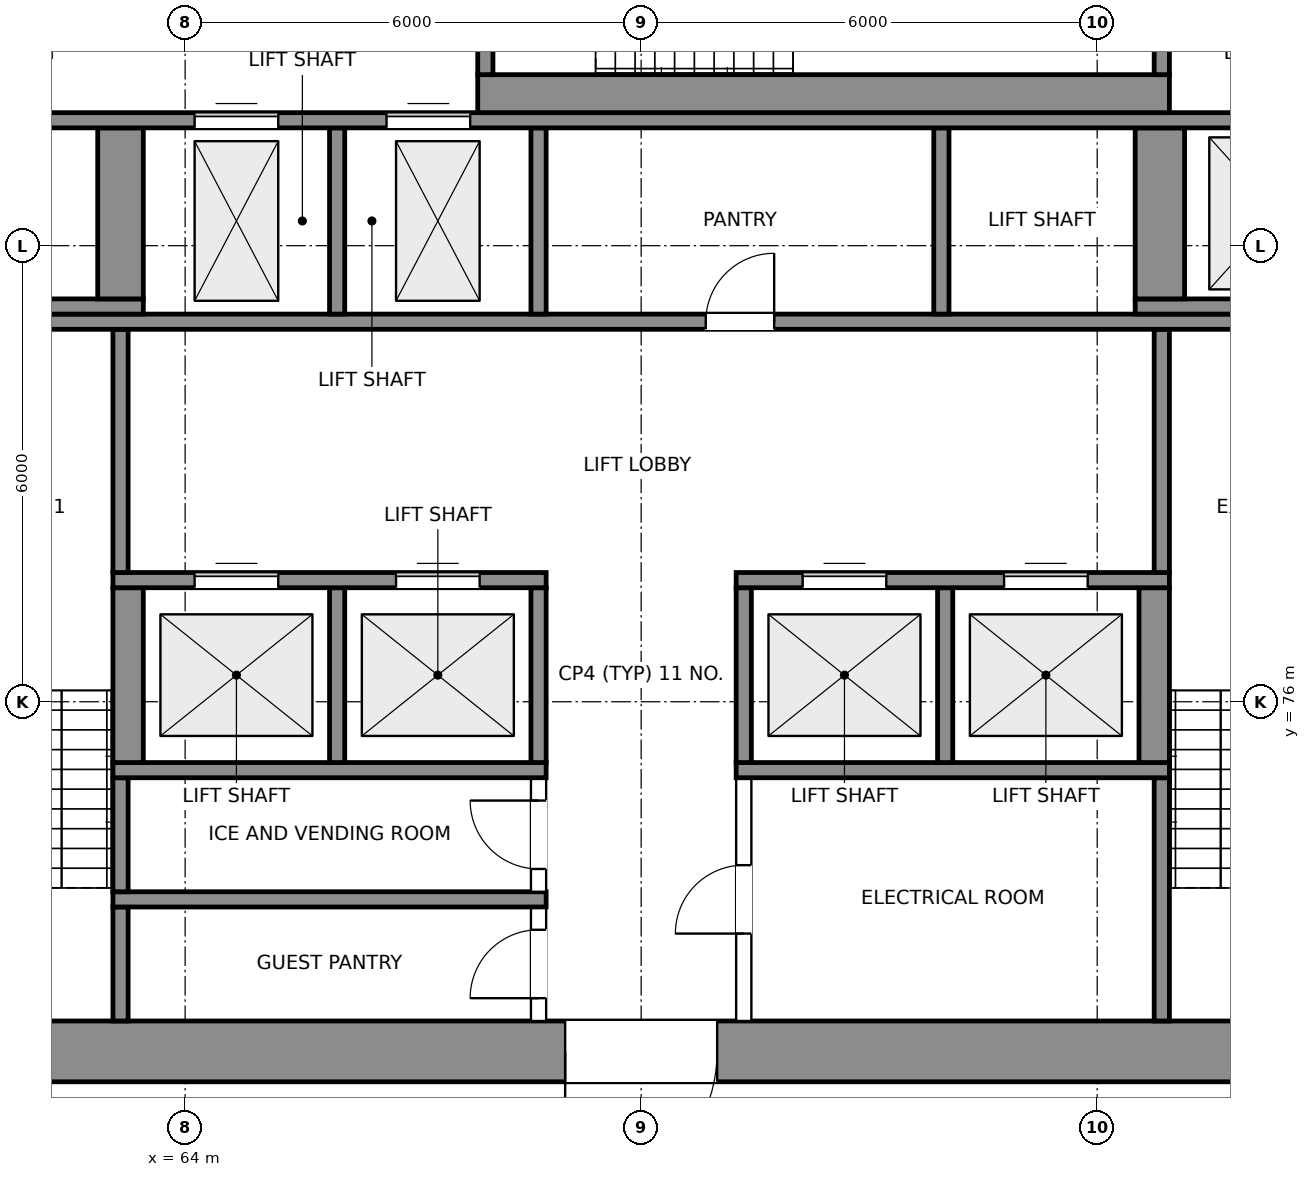
"""IFC4 building model, lengths in metres.
Left out: names, types, materials, properties, quantities, classifications, styles, units other than length and angle.
Written with IfcOpenShell. Run it as: python <this file> out.ifc"""

import sys

from ifc_helpers import new_model, si_unit, direction, frame, frame_2d, origin, place, context, subcontext, project, spatial, rectangle, extrude, element, fill, save


model = new_model("IFC4")
c1 = context("Model", 3, precision=1e-05, world=origin(), true_north=direction((0.0, 1.0)))
c2 = subcontext(c1, "Body", "Model", "MODEL_VIEW")
j1 = project(units=[si_unit("LENGTHUNIT", "METRE"), si_unit("PLANEANGLEUNIT", "RADIAN")], contexts=[c1])
p1 = place(None, origin())
s1 = spatial("IfcSite", under=j1, at=p1, CompositionType="ELEMENT")
p2 = place(p1, origin())
s2 = spatial("IfcBuilding", under=s1, at=p2, CompositionType="ELEMENT")
p3 = place(p2, frame((0.0, 0.0, 204.3)))
s3 = spatial("IfcBuildingStorey", under=s2, at=p3, CompositionType="ELEMENT", Elevation=204.3)
p4 = place(p3, frame((59.0, 71.4, 0.0), z_axis=(0.0, 0.0, 1.0), x_axis=(1.0, 0.0, 0.0)))
e1 = element("IfcWall", 1, at=p4, inside=s3, PredefinedType="SHEAR", context=c2, shape_type="SweptSolid", body=[
    extrude(rectangle(XDim=22.0, YDim=0.8, at=frame_2d((11.0, 0.0))), origin(), (0.0, 0.0, 1.0), 3.9),
])
p5 = place(p4, frame((2.025, 0.0, 0.0)))
e2 = element("IfcOpeningElement", 2, at=p5, cuts=e1, PredefinedType="OPENING", context=c2, shape_type="SweptSolid", body=[
    extrude(rectangle(XDim=1.2, YDim=2.1, at=frame_2d((0.6, 1.05))), frame((0.0, 0.41, 0.0), z_axis=(0.0, -1.0, 0.0), x_axis=(1.0, 0.0, 0.0)), (0.0, 0.0, 1.0), 0.82),
])
p6 = place(p4, frame((18.775, 0.0, 0.0)))
e3 = element("IfcOpeningElement", 3, at=p6, cuts=e1, PredefinedType="OPENING", context=c2, shape_type="SweptSolid", body=[
    extrude(rectangle(XDim=1.2, YDim=2.1, at=frame_2d((0.6, 1.05))), frame((0.0, 0.41, 0.0), z_axis=(0.0, -1.0, 0.0), x_axis=(1.0, 0.0, 0.0)), (0.0, 0.0, 1.0), 0.82),
])
p7 = place(p4, frame((10.0, 0.0, 0.0)))
e4 = element("IfcOpeningElement", 4, at=p7, cuts=e1, PredefinedType="OPENING", context=c2, shape_type="SweptSolid", body=[
    extrude(rectangle(XDim=2.0, YDim=2.1, at=frame_2d((1.0, 1.05))), frame((0.0, 0.41, 0.0), z_axis=(0.0, -1.0, 0.0), x_axis=(1.0, 0.0, 0.0)), (0.0, 0.0, 1.0), 0.82),
])
p8 = place(p3, frame((63.15, 71.8, 0.0), z_axis=(0.0, 0.0, 1.0), x_axis=(0.0, 1.0, 0.0)))
e5 = element("IfcWall", 5, at=p8, inside=s3, PredefinedType="SHEAR", context=c2, shape_type="SweptSolid", body=[
    extrude(rectangle(XDim=1.5, YDim=0.2, at=frame_2d((0.75, 0.0))), origin(), (0.0, 0.0, 1.0), 3.9),
])
p9 = place(p3, frame((68.65, 71.8, 0.0), z_axis=(0.0, 0.0, 1.0), x_axis=(0.0, 1.0, 0.0)))
e6 = element("IfcWall", 6, at=p9, inside=s3, PredefinedType="PARTITIONING", context=c2, shape_type="SweptSolid", body=[
    extrude(rectangle(XDim=1.5, YDim=0.2, at=frame_2d((0.75, 0.0))), origin(), (0.0, 0.0, 1.0), 3.6),
])
p10 = place(p9, frame((0.3, 0.0, 0.0)))
e7 = element("IfcOpeningElement", 7, at=p10, cuts=e6, PredefinedType="OPENING", context=c2, shape_type="SweptSolid", body=[
    extrude(rectangle(XDim=0.9, YDim=2.1, at=frame_2d((0.45, 1.05))), frame((0.0, 0.11, 0.0), z_axis=(0.0, -1.0, 0.0), x_axis=(1.0, 0.0, 0.0)), (0.0, 0.0, 1.0), 0.22),
])
p11 = place(p3, frame((71.35, 71.8, 0.0), z_axis=(0.0, 0.0, 1.0), x_axis=(0.0, 1.0, 0.0)))
e8 = element("IfcWall", 8, at=p11, inside=s3, PredefinedType="PARTITIONING", context=c2, shape_type="SweptSolid", body=[
    extrude(rectangle(XDim=3.2, YDim=0.2, at=frame_2d((1.6, 0.0))), origin(), (0.0, 0.0, 1.0), 3.6),
])
p12 = place(p11, frame((1.15, 0.0, 0.0)))
e9 = element("IfcOpeningElement", 9, at=p12, cuts=e8, PredefinedType="OPENING", context=c2, shape_type="SweptSolid", body=[
    extrude(rectangle(XDim=0.9, YDim=2.1, at=frame_2d((0.45, 1.05))), frame((0.0, 0.11, 0.0), z_axis=(0.0, -1.0, 0.0), x_axis=(1.0, 0.0, 0.0)), (0.0, 0.0, 1.0), 0.22),
])
p13 = place(p3, frame((76.85, 71.8, 0.0), z_axis=(0.0, 0.0, 1.0), x_axis=(0.0, 1.0, 0.0)))
e10 = element("IfcWall", 10, at=p13, inside=s3, PredefinedType="SHEAR", context=c2, shape_type="SweptSolid", body=[
    extrude(rectangle(XDim=3.2, YDim=0.2, at=frame_2d((1.6, 0.0))), origin(), (0.0, 0.0, 1.0), 3.9),
])
p14 = place(p3, frame((63.05, 73.4, 0.0), z_axis=(0.0, 0.0, 1.0), x_axis=(1.0, 0.0, 0.0)))
e11 = element("IfcWall", 11, at=p14, inside=s3, PredefinedType="SHEAR", context=c2, shape_type="SweptSolid", body=[
    extrude(rectangle(XDim=5.7, YDim=0.2, at=frame_2d((2.85, 0.0))), origin(), (0.0, 0.0, 1.0), 3.9),
])
p15 = place(p3, frame((63.15, 73.5, 0.0), z_axis=(0.0, 0.0, 1.0), x_axis=(0.0, 1.0, 0.0)))
e12 = element("IfcWall", 12, at=p15, inside=s3, PredefinedType="SHEAR", context=c2, shape_type="SweptSolid", body=[
    extrude(rectangle(XDim=1.5, YDim=0.2, at=frame_2d((0.75, 0.0))), origin(), (0.0, 0.0, 1.0), 3.9),
])
p16 = place(p3, frame((68.65, 73.5, 0.0), z_axis=(0.0, 0.0, 1.0), x_axis=(0.0, 1.0, 0.0)))
e13 = element("IfcWall", 13, at=p16, inside=s3, PredefinedType="PARTITIONING", context=c2, shape_type="SweptSolid", body=[
    extrude(rectangle(XDim=1.5, YDim=0.2, at=frame_2d((0.75, 0.0))), origin(), (0.0, 0.0, 1.0), 3.6),
])
p17 = place(p16, frame((0.3, 0.0, 0.0)))
e14 = element("IfcOpeningElement", 14, at=p17, cuts=e13, PredefinedType="OPENING", context=c2, shape_type="SweptSolid", body=[
    extrude(rectangle(XDim=0.9, YDim=2.1, at=frame_2d((0.45, 1.05))), frame((0.0, 0.11, 0.0), z_axis=(0.0, -1.0, 0.0), x_axis=(1.0, 0.0, 0.0)), (0.0, 0.0, 1.0), 0.22),
])
for number, where, z_axis, x_axis in (
    (15, (63.05, 75.1, 0.0), (0.0, 0.0, 1.0), (1.0, 0.0, 0.0)),
    (16, (71.25, 75.1, 0.0), (0.0, 0.0, 1.0), (1.0, 0.0, 0.0)),
):
    element("IfcWall", number, at=place(p3, frame(where, z_axis=z_axis, x_axis=x_axis)), inside=s3, PredefinedType="SHEAR", context=c2, shape_type="SweptSolid", body=[
        extrude(rectangle(XDim=5.7, YDim=0.2, at=frame_2d((2.85, 0.0))), origin(), (0.0, 0.0, 1.0), 3.9),
    ])
p18 = place(p3, frame((63.25, 75.2, 0.0), z_axis=(0.0, 0.0, 1.0), x_axis=(0.0, 1.0, 0.0)))
e17 = element("IfcWall", 17, at=p18, inside=s3, PredefinedType="SHEAR", context=c2, shape_type="SweptSolid", body=[
    extrude(rectangle(XDim=2.3, YDim=0.4, at=frame_2d((1.15, 0.0))), origin(), (0.0, 0.0, 1.0), 3.9),
])
for number, where, z_axis, x_axis in (
    (18, (66.0, 75.2, 0.0), (0.0, 0.0, 1.0), (0.0, 1.0, 0.0)),
    (19, (68.65, 75.2, 0.0), (0.0, 0.0, 1.0), (0.0, 1.0, 0.0)),
    (20, (71.35, 75.2, 0.0), (0.0, 0.0, 1.0), (0.0, 1.0, 0.0)),
    (21, (74.0, 75.2, 0.0), (0.0, 0.0, 1.0), (0.0, 1.0, 0.0)),
):
    element("IfcWall", number, at=place(p3, frame(where, z_axis=z_axis, x_axis=x_axis)), inside=s3, PredefinedType="SHEAR", context=c2, shape_type="SweptSolid", body=[
        extrude(rectangle(XDim=2.3, YDim=0.2, at=frame_2d((1.15, 0.0))), origin(), (0.0, 0.0, 1.0), 3.9),
    ])
p19 = place(p3, frame((76.75, 75.2, 0.0), z_axis=(0.0, 0.0, 1.0), x_axis=(0.0, 1.0, 0.0)))
e22 = element("IfcWall", 22, at=p19, inside=s3, PredefinedType="SHEAR", context=c2, shape_type="SweptSolid", body=[
    extrude(rectangle(XDim=2.3, YDim=0.4, at=frame_2d((1.15, 0.0))), origin(), (0.0, 0.0, 1.0), 3.9),
])
p20 = place(p3, frame((63.05, 77.6, 0.0), z_axis=(0.0, 0.0, 1.0), x_axis=(1.0, 0.0, 0.0)))
e23 = element("IfcWall", 23, at=p20, inside=s3, PredefinedType="SHEAR", context=c2, shape_type="SweptSolid", body=[
    extrude(rectangle(XDim=5.7, YDim=0.2, at=frame_2d((2.85, 0.0))), origin(), (0.0, 0.0, 1.0), 3.9),
])
p21 = place(p20, frame((1.075, 0.0, 0.0)))
e24 = element("IfcOpeningElement", 24, at=p21, cuts=e23, PredefinedType="OPENING", context=c2, shape_type="SweptSolid", body=[
    extrude(rectangle(XDim=1.1, YDim=2.1, at=frame_2d((0.55, 1.05))), frame((0.0, 0.11, 0.0), z_axis=(0.0, -1.0, 0.0), x_axis=(1.0, 0.0, 0.0)), (0.0, 0.0, 1.0), 0.22),
])
p22 = place(p20, frame((3.725, 0.0, 0.0)))
e25 = element("IfcOpeningElement", 25, at=p22, cuts=e23, PredefinedType="OPENING", context=c2, shape_type="SweptSolid", body=[
    extrude(rectangle(XDim=1.1, YDim=2.1, at=frame_2d((0.55, 1.05))), frame((0.0, 0.11, 0.0), z_axis=(0.0, -1.0, 0.0), x_axis=(1.0, 0.0, 0.0)), (0.0, 0.0, 1.0), 0.22),
])
p23 = place(p3, frame((71.25, 77.6, 0.0), z_axis=(0.0, 0.0, 1.0), x_axis=(1.0, 0.0, 0.0)))
e26 = element("IfcWall", 26, at=p23, inside=s3, PredefinedType="SHEAR", context=c2, shape_type="SweptSolid", body=[
    extrude(rectangle(XDim=5.7, YDim=0.2, at=frame_2d((2.85, 0.0))), origin(), (0.0, 0.0, 1.0), 3.9),
])
p24 = place(p23, frame((0.875, 0.0, 0.0)))
e27 = element("IfcOpeningElement", 27, at=p24, cuts=e26, PredefinedType="OPENING", context=c2, shape_type="SweptSolid", body=[
    extrude(rectangle(XDim=1.1, YDim=2.1, at=frame_2d((0.55, 1.05))), frame((0.0, 0.11, 0.0), z_axis=(0.0, -1.0, 0.0), x_axis=(1.0, 0.0, 0.0)), (0.0, 0.0, 1.0), 0.22),
])
p25 = place(p23, frame((3.525, 0.0, 0.0)))
e28 = element("IfcOpeningElement", 28, at=p25, cuts=e26, PredefinedType="OPENING", context=c2, shape_type="SweptSolid", body=[
    extrude(rectangle(XDim=1.1, YDim=2.1, at=frame_2d((0.55, 1.05))), frame((0.0, 0.11, 0.0), z_axis=(0.0, -1.0, 0.0), x_axis=(1.0, 0.0, 0.0)), (0.0, 0.0, 1.0), 0.22),
])
for number, where, z_axis, x_axis in (
    (29, (63.15, 77.7, 0.0), (0.0, 0.0, 1.0), (0.0, 1.0, 0.0)),
    (30, (76.85, 77.7, 0.0), (0.0, 0.0, 1.0), (0.0, 1.0, 0.0)),
):
    element("IfcWall", number, at=place(p3, frame(where, z_axis=z_axis, x_axis=x_axis)), inside=s3, PredefinedType="SHEAR", context=c2, shape_type="SweptSolid", body=[
        extrude(rectangle(XDim=3.2, YDim=0.2, at=frame_2d((1.6, 0.0))), origin(), (0.0, 0.0, 1.0), 3.9),
    ])
p26 = place(p3, frame((59.0, 81.0, 0.0), z_axis=(0.0, 0.0, 1.0), x_axis=(1.0, 0.0, 0.0)))
e31 = element("IfcWall", 31, at=p26, inside=s3, PredefinedType="SHEAR", context=c2, shape_type="SweptSolid", body=[
    extrude(rectangle(XDim=22.0, YDim=0.2, at=frame_2d((11.0, 0.0))), origin(), (0.0, 0.0, 1.0), 3.9),
])
p27 = place(p26, frame((11.85, 0.0, 0.0)))
e32 = element("IfcOpeningElement", 32, at=p27, cuts=e31, PredefinedType="OPENING", context=c2, shape_type="SweptSolid", body=[
    extrude(rectangle(XDim=0.9, YDim=2.1, at=frame_2d((0.45, 1.05))), frame((0.0, 0.11, 0.0), z_axis=(0.0, -1.0, 0.0), x_axis=(1.0, 0.0, 0.0)), (0.0, 0.0, 1.0), 0.22),
])
p28 = place(p3, frame((59.0, 81.2, 0.0), z_axis=(0.0, 0.0, 1.0), x_axis=(1.0, 0.0, 0.0)))
e33 = element("IfcWall", 33, at=p28, inside=s3, PredefinedType="SHEAR", context=c2, shape_type="SweptSolid", body=[
    extrude(rectangle(XDim=4.45, YDim=0.2, at=frame_2d((2.225, 0.0))), origin(), (0.0, 0.0, 1.0), 3.9),
])
for number, where, z_axis, x_axis in (
    (34, (66.0, 81.1, 0.0), (0.0, 0.0, 1.0), (0.0, 1.0, 0.0)),
    (35, (68.65, 81.1, 0.0), (0.0, 0.0, 1.0), (0.0, 1.0, 0.0)),
    (36, (73.95, 81.1, 0.0), (0.0, 0.0, 1.0), (0.0, 1.0, 0.0)),
):
    element("IfcWall", number, at=place(p3, frame(where, z_axis=z_axis, x_axis=x_axis)), inside=s3, PredefinedType="SHEAR", context=c2, shape_type="SweptSolid", body=[
        extrude(rectangle(XDim=2.45, YDim=0.2, at=frame_2d((1.225, 0.0))), origin(), (0.0, 0.0, 1.0), 3.9),
    ])
p29 = place(p3, frame((76.5, 81.2, 0.0), z_axis=(0.0, 0.0, 1.0), x_axis=(1.0, 0.0, 0.0)))
e37 = element("IfcWall", 37, at=p29, inside=s3, PredefinedType="SHEAR", context=c2, shape_type="SweptSolid", body=[
    extrude(rectangle(XDim=4.5, YDim=0.2, at=frame_2d((2.25, 0.0))), origin(), (0.0, 0.0, 1.0), 3.9),
])
p30 = place(p3, frame((63.15, 81.3, 0.0), z_axis=(0.0, 0.0, 1.0), x_axis=(0.0, 1.0, 0.0)))
e38 = element("IfcWall", 38, at=p30, inside=s3, PredefinedType="SHEAR", context=c2, shape_type="SweptSolid", body=[
    extrude(rectangle(XDim=2.25, YDim=0.6, at=frame_2d((1.125, 0.0))), origin(), (0.0, 0.0, 1.0), 3.9),
])
p31 = place(p3, frame((76.825, 81.3, 0.0), z_axis=(0.0, 0.0, 1.0), x_axis=(0.0, 1.0, 0.0)))
e39 = element("IfcWall", 39, at=p31, inside=s3, PredefinedType="SHEAR", context=c2, shape_type="SweptSolid", body=[
    extrude(rectangle(XDim=2.25, YDim=0.65, at=frame_2d((1.125, 0.0))), origin(), (0.0, 0.0, 1.0), 3.9),
])
p32 = place(p3, frame((59.0, 83.65, 0.0), z_axis=(0.0, 0.0, 1.0), x_axis=(1.0, 0.0, 0.0)))
e40 = element("IfcWall", 40, at=p32, inside=s3, PredefinedType="SHEAR", context=c2, shape_type="SweptSolid", body=[
    extrude(rectangle(XDim=22.0, YDim=0.2, at=frame_2d((11.0, 0.0))), origin(), (0.0, 0.0, 1.0), 3.9),
])
p33 = place(p32, frame((5.125, 0.0, 0.0)))
e41 = element("IfcOpeningElement", 41, at=p33, cuts=e40, PredefinedType="OPENING", context=c2, shape_type="SweptSolid", body=[
    extrude(rectangle(XDim=1.1, YDim=2.1, at=frame_2d((0.55, 1.05))), frame((0.0, 0.11, 0.0), z_axis=(0.0, -1.0, 0.0), x_axis=(1.0, 0.0, 0.0)), (0.0, 0.0, 1.0), 0.22),
])
p34 = place(p32, frame((7.65, 0.0, 0.0)))
e42 = element("IfcOpeningElement", 42, at=p34, cuts=e40, PredefinedType="OPENING", context=c2, shape_type="SweptSolid", body=[
    extrude(rectangle(XDim=1.1, YDim=2.1, at=frame_2d((0.55, 1.05))), frame((0.0, 0.11, 0.0), z_axis=(0.0, -1.0, 0.0), x_axis=(1.0, 0.0, 0.0)), (0.0, 0.0, 1.0), 0.22),
])
p35 = place(p32, frame((18.775, 0.0, 0.0)))
e43 = element("IfcOpeningElement", 43, at=p35, cuts=e40, PredefinedType="OPENING", context=c2, shape_type="SweptSolid", body=[
    extrude(rectangle(XDim=1.2, YDim=2.1, at=frame_2d((0.6, 1.05))), frame((0.0, 0.11, 0.0), z_axis=(0.0, -1.0, 0.0), x_axis=(1.0, 0.0, 0.0)), (0.0, 0.0, 1.0), 0.22),
])
p36 = place(p32, frame((2.075, 0.0, 0.0)))
e44 = element("IfcOpeningElement", 44, at=p36, cuts=e40, PredefinedType="OPENING", context=c2, shape_type="SweptSolid", body=[
    extrude(rectangle(XDim=1.1, YDim=2.1, at=frame_2d((0.55, 1.05))), frame((0.0, 0.11, 0.0), z_axis=(0.0, -1.0, 0.0), x_axis=(1.0, 0.0, 0.0)), (0.0, 0.0, 1.0), 0.22),
])
p37 = place(p3, frame((67.85, 84.0, 0.0), z_axis=(0.0, 0.0, 1.0), x_axis=(1.0, 0.0, 0.0)))
e45 = element("IfcWall", 45, at=p37, inside=s3, PredefinedType="SHEAR", context=c2, shape_type="SweptSolid", body=[
    extrude(rectangle(XDim=9.1, YDim=0.5, at=frame_2d((4.55, 0.0))), origin(), (0.0, 0.0, 1.0), 3.9),
])
p38 = place(p3, frame((67.95, 84.25, 0.0), z_axis=(0.0, 0.0, 1.0), x_axis=(0.0, 1.0, 0.0)))
e46 = element("IfcWall", 46, at=p38, inside=s3, PredefinedType="SHEAR", context=c2, shape_type="SweptSolid", body=[
    extrude(rectangle(XDim=2.85, YDim=0.2, at=frame_2d((1.425, 0.0))), origin(), (0.0, 0.0, 1.0), 3.9),
])
p39 = place(p38, frame((0.825, 0.0, 0.0)))
e47 = element("IfcOpeningElement", 47, at=p39, cuts=e46, PredefinedType="OPENING", context=c2, shape_type="SweptSolid", body=[
    extrude(rectangle(XDim=1.2, YDim=2.1, at=frame_2d((0.6, 1.05))), frame((0.0, 0.11, 0.0), z_axis=(0.0, -1.0, 0.0), x_axis=(1.0, 0.0, 0.0)), (0.0, 0.0, 1.0), 0.22),
])
p40 = place(p3, frame((76.85, 84.25, 0.0), z_axis=(0.0, 0.0, 1.0), x_axis=(0.0, 1.0, 0.0)))
e48 = element("IfcWall", 48, at=p40, inside=s3, PredefinedType="SHEAR", context=c2, shape_type="SweptSolid", body=[
    extrude(rectangle(XDim=2.85, YDim=0.2, at=frame_2d((1.425, 0.0))), origin(), (0.0, 0.0, 1.0), 3.9),
])
p41 = place(p7, frame((2.0, 0.0, 0.0), z_axis=(0.0, 0.0, 1.0), x_axis=(-1.0, 0.0, 0.0)))
e49 = element("IfcDoor", 49, at=p41, inside=s3, OperationType="DOUBLE_DOOR_SINGLE_SWING", PredefinedType="DOOR", context=c2, shape_type="SweptSolid", body=[
    extrude(rectangle(XDim=2.0, YDim=2.1, at=frame_2d((1.0, 1.05))), frame((0.0, 0.025, 0.0), z_axis=(0.0, -1.0, 0.0), x_axis=(1.0, 0.0, 0.0)), (0.0, 0.0, 1.0), 0.05),
])
fill(e4, e49)
p42 = place(p10, origin())
e50 = element("IfcDoor", 50, at=p42, inside=s3, OperationType="SINGLE_SWING_LEFT", PredefinedType="DOOR", context=c2, shape_type="SweptSolid", body=[
    extrude(rectangle(XDim=0.9, YDim=2.1, at=frame_2d((0.45, 1.05))), frame((0.0, 0.025, 0.0), z_axis=(0.0, -1.0, 0.0), x_axis=(1.0, 0.0, 0.0)), (0.0, 0.0, 1.0), 0.05),
])
fill(e7, e50)
p43 = place(p17, origin())
e51 = element("IfcDoor", 51, at=p43, inside=s3, OperationType="SINGLE_SWING_RIGHT", PredefinedType="DOOR", context=c2, shape_type="SweptSolid", body=[
    extrude(rectangle(XDim=0.9, YDim=2.1, at=frame_2d((0.45, 1.05))), frame((0.0, 0.025, 0.0), z_axis=(0.0, -1.0, 0.0), x_axis=(1.0, 0.0, 0.0)), (0.0, 0.0, 1.0), 0.05),
])
fill(e14, e51)
p44 = place(p12, origin())
e52 = element("IfcDoor", 52, at=p44, inside=s3, OperationType="SINGLE_SWING_LEFT", PredefinedType="DOOR", context=c2, shape_type="SweptSolid", body=[
    extrude(rectangle(XDim=0.9, YDim=2.1, at=frame_2d((0.45, 1.05))), frame((0.0, 0.025, 0.0), z_axis=(0.0, -1.0, 0.0), x_axis=(1.0, 0.0, 0.0)), (0.0, 0.0, 1.0), 0.05),
])
fill(e9, e52)
p45 = place(p21, origin())
e53 = element("IfcDoor", 53, at=p45, inside=s3, OperationType="DOUBLE_DOOR_SLIDING", PredefinedType="DOOR", context=c2, shape_type="SweptSolid", body=[
    extrude(rectangle(XDim=1.1, YDim=2.1, at=frame_2d((0.55, 1.05))), frame((0.0, 0.025, 0.0), z_axis=(0.0, -1.0, 0.0), x_axis=(1.0, 0.0, 0.0)), (0.0, 0.0, 1.0), 0.05),
])
fill(e24, e53)
p46 = place(p22, origin())
e54 = element("IfcDoor", 54, at=p46, inside=s3, OperationType="DOUBLE_DOOR_SLIDING", PredefinedType="DOOR", context=c2, shape_type="SweptSolid", body=[
    extrude(rectangle(XDim=1.1, YDim=2.1, at=frame_2d((0.55, 1.05))), frame((0.0, 0.025, 0.0), z_axis=(0.0, -1.0, 0.0), x_axis=(1.0, 0.0, 0.0)), (0.0, 0.0, 1.0), 0.05),
])
fill(e25, e54)
p47 = place(p24, origin())
e55 = element("IfcDoor", 55, at=p47, inside=s3, OperationType="DOUBLE_DOOR_SLIDING", PredefinedType="DOOR", context=c2, shape_type="SweptSolid", body=[
    extrude(rectangle(XDim=1.1, YDim=2.1, at=frame_2d((0.55, 1.05))), frame((0.0, 0.025, 0.0), z_axis=(0.0, -1.0, 0.0), x_axis=(1.0, 0.0, 0.0)), (0.0, 0.0, 1.0), 0.05),
])
fill(e27, e55)
p48 = place(p25, origin())
e56 = element("IfcDoor", 56, at=p48, inside=s3, OperationType="DOUBLE_DOOR_SLIDING", PredefinedType="DOOR", context=c2, shape_type="SweptSolid", body=[
    extrude(rectangle(XDim=1.1, YDim=2.1, at=frame_2d((0.55, 1.05))), frame((0.0, 0.025, 0.0), z_axis=(0.0, -1.0, 0.0), x_axis=(1.0, 0.0, 0.0)), (0.0, 0.0, 1.0), 0.05),
])
fill(e28, e56)
p49 = place(p33, origin())
e57 = element("IfcDoor", 57, at=p49, inside=s3, OperationType="DOUBLE_DOOR_SLIDING", PredefinedType="DOOR", context=c2, shape_type="SweptSolid", body=[
    extrude(rectangle(XDim=1.1, YDim=2.1, at=frame_2d((0.55, 1.05))), frame((0.0, 0.025, 0.0), z_axis=(0.0, -1.0, 0.0), x_axis=(1.0, 0.0, 0.0)), (0.0, 0.0, 1.0), 0.05),
])
fill(e41, e57)
p50 = place(p34, origin())
e58 = element("IfcDoor", 58, at=p50, inside=s3, OperationType="DOUBLE_DOOR_SLIDING", PredefinedType="DOOR", context=c2, shape_type="SweptSolid", body=[
    extrude(rectangle(XDim=1.1, YDim=2.1, at=frame_2d((0.55, 1.05))), frame((0.0, 0.025, 0.0), z_axis=(0.0, -1.0, 0.0), x_axis=(1.0, 0.0, 0.0)), (0.0, 0.0, 1.0), 0.05),
])
fill(e42, e58)
p51 = place(p27, origin())
e59 = element("IfcDoor", 59, at=p51, inside=s3, OperationType="SINGLE_SWING_RIGHT", PredefinedType="DOOR", context=c2, shape_type="SweptSolid", body=[
    extrude(rectangle(XDim=0.9, YDim=2.1, at=frame_2d((0.45, 1.05))), frame((0.0, 0.025, 0.0), z_axis=(0.0, -1.0, 0.0), x_axis=(1.0, 0.0, 0.0)), (0.0, 0.0, 1.0), 0.05),
])
fill(e32, e59)
save(model, sys.argv[1])
